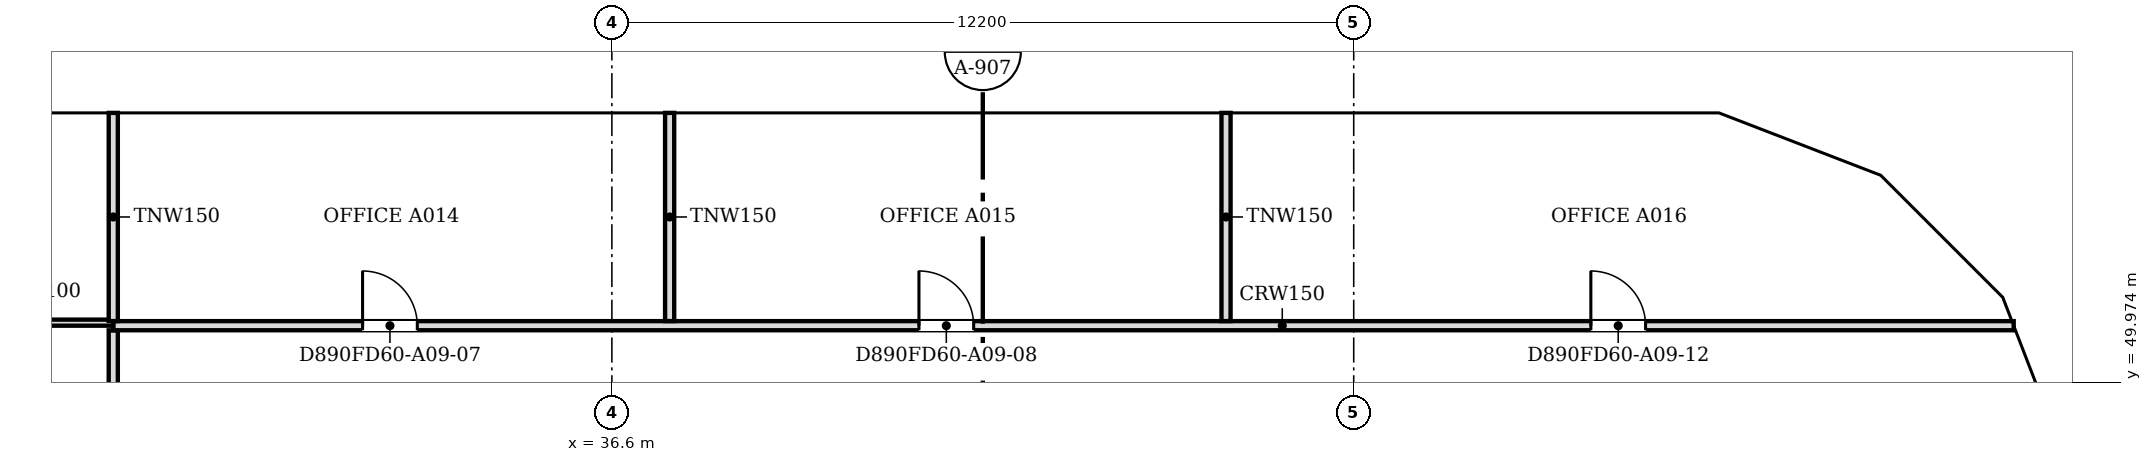
"""IFC4 building model, lengths in metres.
Left out: names, types, materials, properties, quantities, classifications, styles, units other than length and angle.
Written with IfcOpenShell. Run it as: python <this file> out.ifc"""

import sys

from ifc_helpers import new_model, si_unit, direction, frame, frame_2d, origin, place, context, subcontext, project, spatial, polyline, rectangle, outline, extrude, faceted_brep, source, transform, mapped, element, fill, save


model = new_model("IFC4")
c1 = context("Model", 3, precision=1e-05, world=origin(), true_north=direction((0.0, 1.0)))
c2 = subcontext(c1, "Body", "Model", "MODEL_VIEW")
j1 = project(units=[si_unit("LENGTHUNIT", "METRE"), si_unit("PLANEANGLEUNIT", "RADIAN")], contexts=[c1])
p1 = place(None, origin())
s1 = spatial("IfcSite", under=j1, at=p1, CompositionType="ELEMENT")
p2 = place(p1, origin())
s2 = spatial("IfcBuilding", under=s1, at=p2, CompositionType="ELEMENT")
p3 = place(p2, frame((0.0, 0.0, 102.8)))
s3 = spatial("IfcBuildingStorey", under=s2, at=p3, CompositionType="ELEMENT", Elevation=102.8)
m1 = source(origin(), c2, "Body", "Brep", [
    faceted_brep([(0.047, -0.25, 0.0), (2.997, -0.25, 3.8), (0.047, -0.25, 7.6), (0.0, -0.25, 7.541), (0.0, -0.25, 0.059), (0.093, 0.25, 7.54), (2.944, 0.25, 3.868), (2.944, 0.25, 3.732), (0.093, 0.25, 0.06), (2.997, 0.0, 3.8), (0.047, 0.0, 0.0), (0.047, 0.0, 7.6)], [[[0, 1, 2, 3, 4]], [[5, 6, 7, 8]], [[8, 7, 9, 1, 0, 10]], [[6, 5, 11, 2, 1, 9]], [[3, 2, 11]], [[10, 0, 4]], [[8, 10, 4, 3, 11, 5]], [[9, 7, 6]]]),
])
p4 = place(p3, frame((60.767, 48.71, -3.8), z_axis=(0.0, 0.0, 1.0), x_axis=(-0.359901446078, 0.932990326376, 0.0)))
e1 = element("IfcWall", 1, at=p4, inside=s3, PredefinedType="SOLIDWALL", context=c2, shape_type="MappedRepresentation", body=[
    mapped(m1, transform((0.0, 0.0, 0.0), scale=1.0)),
])
m2 = source(origin(), c2, "Body", "SweptSolid", [
    extrude(outline(polyline([(0.247, 0.665), (2.681, 3.8), (0.247, 6.935), (0.247, 0.665)])), frame((0.0, 0.26, 0.0), z_axis=(0.0, -1.0, 0.0), x_axis=(1.0, 0.0, 0.0)), (0.0, 0.0, 1.0), 0.52),
])
p5 = place(p4, origin())
e2 = element("IfcOpeningElement", 2, at=p5, cuts=e1, PredefinedType="OPENING", context=c2, shape_type="MappedRepresentation", body=[
    mapped(m2, transform((0.0, 0.0, 0.0), scale=1.0)),
])
m3 = source(origin(), c2, "Body", "Brep", [
    faceted_brep([(2.944, -0.25, 0.0), (2.997, -0.25, 0.068), (2.997, -0.25, 7.532), (2.944, -0.25, 7.6), (0.0, -0.25, 3.8), (0.053, 0.25, 3.868), (2.891, 0.25, 7.532), (2.891, 0.25, 0.068), (0.053, 0.25, 3.732), (2.944, 0.0, 0.0), (2.944, 0.0, 7.6), (0.0, 0.0, 3.8)], [[[0, 1, 2, 3, 4]], [[5, 6, 7, 8]], [[1, 0, 9]], [[10, 3, 2]], [[6, 5, 11, 4, 3, 10]], [[8, 7, 9, 0, 4, 11]], [[8, 11, 5]], [[1, 9, 7, 6, 10, 2]]]),
])
p6 = place(p3, frame((59.688, 51.506, -3.8), z_axis=(0.0, 0.0, 1.0), x_axis=(-0.707106781187, 0.707106781187, 0.0)))
e3 = element("IfcWall", 3, at=p6, inside=s3, PredefinedType="SOLIDWALL", context=c2, shape_type="MappedRepresentation", body=[
    mapped(m3, transform((0.0, 0.0, 0.0), scale=1.0)),
])
m4 = source(origin(), c2, "Body", "SweptSolid", [
    extrude(outline(polyline([(2.744, 6.934), (0.316, 3.8), (2.744, 0.666), (2.744, 6.934)])), frame((0.0, 0.26, 0.0), z_axis=(0.0, -1.0, 0.0), x_axis=(1.0, 0.0, 0.0)), (0.0, 0.0, 1.0), 0.52),
])
p7 = place(p6, origin())
e4 = element("IfcOpeningElement", 4, at=p7, cuts=e3, PredefinedType="OPENING", context=c2, shape_type="MappedRepresentation", body=[
    mapped(m4, transform((0.0, 0.0, 0.0), scale=1.0)),
])
m5 = source(origin(), c2, "Body", "Brep", [
    faceted_brep([(0.053, -0.25, 0.0), (3.003, -0.25, 3.8), (0.053, -0.25, 7.6), (0.0, -0.25, 7.532), (0.0, -0.25, 0.068), (0.106, 0.25, 7.532), (2.957, 0.25, 3.86), (2.957, 0.25, 3.74), (0.106, 0.25, 0.068), (3.003, 0.0, 3.8), (0.053, 0.0, 0.0), (0.053, 0.0, 7.6)], [[[0, 1, 2, 3, 4]], [[5, 6, 7, 8]], [[8, 7, 9, 1, 0, 10]], [[6, 5, 11, 2, 1, 9]], [[3, 2, 11]], [[10, 0, 4]], [[8, 10, 4, 3, 11, 5]], [[9, 7, 6]]]),
])
p8 = place(p3, frame((57.656, 53.569, -3.8), z_axis=(0.0, 0.0, 1.0), x_axis=(-0.933007896601, 0.359855894603, 0.0)))
e5 = element("IfcWall", 5, at=p8, inside=s3, PredefinedType="SOLIDWALL", context=c2, shape_type="MappedRepresentation", body=[
    mapped(m5, transform((0.0, 0.0, 0.0), scale=1.0)),
])
m6 = source(origin(), c2, "Body", "SweptSolid", [
    extrude(outline(polyline([(0.253, 0.665), (2.687, 3.8), (0.253, 6.935), (0.253, 0.665)])), frame((0.0, 0.26, 0.0), z_axis=(0.0, -1.0, 0.0), x_axis=(1.0, 0.0, 0.0)), (0.0, 0.0, 1.0), 0.52),
])
p9 = place(p8, origin())
e6 = element("IfcOpeningElement", 6, at=p9, cuts=e5, PredefinedType="OPENING", context=c2, shape_type="MappedRepresentation", body=[
    mapped(m6, transform((0.0, 0.0, 0.0), scale=1.0)),
])
m7 = source(origin(), c2, "Body", "Brep", [
    faceted_brep([(3.003, -0.25, 0.0), (6.053, -0.25, 3.8), (3.003, -0.25, 7.6), (0.0, -0.25, 3.8), (0.047, 0.25, 3.859), (3.003, 0.25, 7.6), (6.053, 0.25, 3.8), (3.003, 0.25, 0.0), (0.047, 0.25, 3.741), (0.0, 0.0, 3.8)], [[[0, 1, 2, 3]], [[4, 5, 6, 7, 8]], [[7, 6, 1, 0]], [[6, 5, 2, 1]], [[5, 4, 9, 3, 2]], [[8, 7, 0, 3, 9]], [[8, 9, 4]]]),
])
p10 = place(p3, frame((54.854, 54.65, -3.8), z_axis=(0.0, 0.0, 1.0), x_axis=(-1.0, 0.0, 0.0)))
e7 = element("IfcWall", 7, at=p10, inside=s3, PredefinedType="SOLIDWALL", context=c2, shape_type="MappedRepresentation", body=[
    mapped(m7, transform((0.0, 0.0, 0.0), scale=1.0)),
])
m8 = source(origin(), c2, "Body", "SweptSolid", [
    extrude(outline(polyline([(3.005, 0.401), (5.733, 3.8), (3.005, 7.199), (0.319, 3.8), (3.005, 0.401)])), frame((0.0, 0.26, 0.0), z_axis=(0.0, -1.0, 0.0), x_axis=(1.0, 0.0, 0.0)), (0.0, 0.0, 1.0), 0.52),
])
p11 = place(p10, origin())
e8 = element("IfcOpeningElement", 8, at=p11, cuts=e7, PredefinedType="OPENING", context=c2, shape_type="MappedRepresentation", body=[
    mapped(m8, transform((0.0, 0.0, 0.0), scale=1.0)),
])
m9 = source(origin(), c2, "Body", "SweptSolid", [
    extrude(outline(polyline([(3.05, 0.0), (6.1, 3.8), (3.05, 7.6), (0.0, 3.8), (3.05, 0.0)])), frame((0.0, 0.25, 0.0), z_axis=(0.0, -1.0, 0.0), x_axis=(1.0, 0.0, 0.0)), (0.0, 0.0, 1.0), 0.5),
])
p12 = place(p3, frame((48.8, 54.65, -3.8), z_axis=(0.0, 0.0, 1.0), x_axis=(-1.0, 0.0, 0.0)))
e9 = element("IfcWall", 9, at=p12, inside=s3, PredefinedType="SOLIDWALL", context=c2, shape_type="MappedRepresentation", body=[
    mapped(m9, transform((0.0, 0.0, 0.0), scale=1.0)),
])
m10 = source(origin(), c2, "Body", "SweptSolid", [
    extrude(outline(polyline([(3.05, 0.399), (5.78, 3.8), (3.05, 7.201), (0.321, 3.8), (3.05, 0.399)])), frame((0.0, 0.26, 0.0), z_axis=(0.0, -1.0, 0.0), x_axis=(1.0, 0.0, 0.0)), (0.0, 0.0, 1.0), 0.52),
])
p13 = place(p12, origin())
e10 = element("IfcOpeningElement", 10, at=p13, cuts=e9, PredefinedType="OPENING", context=c2, shape_type="MappedRepresentation", body=[
    mapped(m10, transform((0.0, 0.0, 0.0), scale=1.0)),
])
m11 = source(origin(), c2, "Body", "Brep", [
    faceted_brep([(3.05, -0.25, 0.0), (6.1, -0.25, 3.8), (6.1, -0.25, 3.8), (3.05, -0.25, 7.6), (0.0, -0.25, 3.8), (0.0, 0.25, 3.8), (3.05, 0.25, 7.6), (6.1, 0.25, 3.8), (6.1, 0.25, 3.8), (3.05, 0.25, 0.0)], [[[0, 1, 2, 3, 4]], [[5, 6, 7, 8, 9]], [[9, 8, 1, 0]], [[7, 6, 3, 2]], [[6, 5, 4, 3]], [[5, 9, 0, 4]], [[1, 8, 7, 2]]]),
])
p14 = place(p3, frame((42.7, 54.65, -3.8), z_axis=(0.0, 0.0, 1.0), x_axis=(-1.0, 0.0, 0.0)))
e11 = element("IfcWall", 11, at=p14, inside=s3, PredefinedType="SOLIDWALL", context=c2, shape_type="MappedRepresentation", body=[
    mapped(m11, transform((0.0, 0.0, 0.0), scale=1.0)),
])
p15 = place(p14, origin())
e12 = element("IfcOpeningElement", 12, at=p15, cuts=e11, PredefinedType="OPENING", context=c2, shape_type="MappedRepresentation", body=[
    mapped(m10, transform((0.0, 0.0, 0.0), scale=1.0)),
])
p16 = place(p3, frame((36.6, 54.65, -3.8), z_axis=(0.0, 0.0, 1.0), x_axis=(-1.0, 0.0, 0.0)))
e13 = element("IfcWall", 13, at=p16, inside=s3, PredefinedType="SOLIDWALL", context=c2, shape_type="MappedRepresentation", body=[
    mapped(m9, transform((0.0, 0.0, 0.0), scale=1.0)),
])
p17 = place(p16, origin())
e14 = element("IfcOpeningElement", 14, at=p17, cuts=e13, PredefinedType="OPENING", context=c2, shape_type="MappedRepresentation", body=[
    mapped(m10, transform((0.0, 0.0, 0.0), scale=1.0)),
])
p18 = place(p3, frame((30.5, 54.65, -3.8), z_axis=(0.0, 0.0, 1.0), x_axis=(-1.0, 0.0, 0.0)))
e15 = element("IfcWall", 15, at=p18, inside=s3, PredefinedType="SOLIDWALL", context=c2, shape_type="MappedRepresentation", body=[
    mapped(m9, transform((0.0, 0.0, 0.0), scale=1.0)),
])
p19 = place(p18, origin())
e16 = element("IfcOpeningElement", 16, at=p19, cuts=e15, PredefinedType="OPENING", context=c2, shape_type="MappedRepresentation", body=[
    mapped(m10, transform((0.0, 0.0, 0.0), scale=1.0)),
])
m12 = source(origin(), c2, "Body", "Brep", [
    faceted_brep([(2.95, -0.25, 0.0), (3.003, -0.25, 0.068), (3.003, -0.25, 3.8), (0.0, -0.25, 3.8), (0.047, 0.25, 3.8), (2.898, 0.25, 3.8), (2.898, 0.25, 0.068), (0.047, 0.25, 3.74), (2.95, 0.0, 0.0), (0.0, 0.0, 3.8)], [[[0, 1, 2, 3]], [[4, 5, 6, 7]], [[1, 0, 8]], [[5, 4, 9, 3, 2]], [[7, 6, 8, 0, 3, 9]], [[7, 9, 4]], [[1, 8, 6, 5, 2]]]),
])
p20 = place(p3, frame((60.75, 48.753, 0.0), z_axis=(0.0, 0.0, 1.0), x_axis=(-0.35992665181, 0.932980602862, 0.0)))
e17 = element("IfcWall", 17, at=p20, inside=s3, PredefinedType="SOLIDWALL", context=c2, shape_type="MappedRepresentation", body=[
    mapped(m12, transform((0.0, 0.0, 0.0), scale=1.0)),
])
m13 = source(origin(), c2, "Body", "SweptSolid", [
    extrude(outline(polyline([(2.75, 3.55), (0.511, 3.55), (2.75, 0.665), (2.75, 3.55)])), frame((0.0, 0.26, 0.0), z_axis=(0.0, -1.0, 0.0), x_axis=(1.0, 0.0, 0.0)), (0.0, 0.0, 1.0), 0.52),
])
p21 = place(p20, origin())
e18 = element("IfcOpeningElement", 18, at=p21, cuts=e17, PredefinedType="OPENING", context=c2, shape_type="MappedRepresentation", body=[
    mapped(m13, transform((0.0, 0.0, 0.0), scale=1.0)),
])
m14 = source(origin(), c2, "Body", "Brep", [
    faceted_brep([(0.053, -0.25, 0.0), (2.997, -0.25, 3.8), (0.0, -0.25, 3.8), (0.0, -0.25, 0.068), (0.106, 0.25, 3.8), (2.944, 0.25, 3.8), (2.944, 0.25, 3.732), (0.106, 0.25, 0.068), (2.997, 0.0, 3.8), (0.053, 0.0, 0.0)], [[[0, 1, 2, 3]], [[4, 5, 6, 7]], [[7, 6, 8, 1, 0, 9]], [[5, 4, 2, 1, 8]], [[9, 0, 3]], [[7, 9, 3, 2, 4]], [[6, 5, 8]]]),
])
p22 = place(p3, frame((59.726, 51.469, 0.0), z_axis=(0.0, 0.0, 1.0), x_axis=(-0.707106781187, 0.707106781187, 0.0)))
e19 = element("IfcWall", 19, at=p22, inside=s3, PredefinedType="SOLIDWALL", context=c2, shape_type="MappedRepresentation", body=[
    mapped(m14, transform((0.0, 0.0, 0.0), scale=1.0)),
])
m15 = source(origin(), c2, "Body", "SweptSolid", [
    extrude(outline(polyline([(0.253, 0.666), (2.487, 3.55), (0.253, 3.55), (0.253, 0.666)])), frame((0.0, 0.26, 0.0), z_axis=(0.0, -1.0, 0.0), x_axis=(1.0, 0.0, 0.0)), (0.0, 0.0, 1.0), 0.52),
])
p23 = place(p22, origin())
e20 = element("IfcOpeningElement", 20, at=p23, cuts=e19, PredefinedType="OPENING", context=c2, shape_type="MappedRepresentation", body=[
    mapped(m15, transform((0.0, 0.0, 0.0), scale=1.0)),
])
m16 = source(origin(), c2, "Body", "Brep", [
    faceted_brep([(2.95, -0.25, 0.0), (2.997, -0.25, 0.059), (2.997, -0.25, 3.8), (0.0, -0.25, 3.8), (0.053, 0.25, 3.8), (2.904, 0.25, 3.8), (2.904, 0.25, 0.06), (0.053, 0.25, 3.732), (2.95, 0.0, 0.0), (0.0, 0.0, 3.8)], [[[0, 1, 2, 3]], [[4, 5, 6, 7]], [[1, 0, 8]], [[5, 4, 9, 3, 2]], [[7, 6, 8, 0, 3, 9]], [[7, 9, 4]], [[1, 8, 6, 5, 2]]]),
])
p24 = place(p3, frame((57.606, 53.588, 0.0), z_axis=(0.0, 0.0, 1.0), x_axis=(-0.932990326376, 0.359901446078, 0.0)))
e21 = element("IfcWall", 21, at=p24, inside=s3, PredefinedType="SOLIDWALL", context=c2, shape_type="MappedRepresentation", body=[
    mapped(m16, transform((0.0, 0.0, 0.0), scale=1.0)),
])
p25 = place(p24, origin())
e22 = element("IfcOpeningElement", 22, at=p25, cuts=e21, PredefinedType="OPENING", context=c2, shape_type="MappedRepresentation", body=[
    mapped(m13, transform((0.0, 0.0, 0.0), scale=1.0)),
])
m17 = source(origin(), c2, "Body", "Brep", [
    faceted_brep([(0.047, -0.25, 0.0), (3.05, -0.25, 3.8), (0.0, -0.25, 3.8), (0.0, -0.25, 0.06), (0.093, 0.25, 3.8), (3.05, 0.25, 3.8), (0.093, 0.25, 0.059), (0.047, 0.0, 0.0)], [[[0, 1, 2, 3]], [[4, 5, 6]], [[6, 5, 1, 0, 7]], [[5, 4, 2, 1]], [[7, 0, 3]], [[6, 7, 3, 2, 4]]]),
])
p26 = place(p3, frame((54.9, 54.65, 0.0), z_axis=(0.0, 0.0, 1.0), x_axis=(-1.0, 0.0, 0.0)))
e23 = element("IfcWall", 23, at=p26, inside=s3, PredefinedType="SOLIDWALL", context=c2, shape_type="MappedRepresentation", body=[
    mapped(m17, transform((0.0, 0.0, 0.0), scale=1.0)),
])
m18 = source(origin(), c2, "Body", "SweptSolid", [
    extrude(outline(polyline([(0.247, 0.656), (2.534, 3.55), (0.247, 3.55), (0.247, 0.656)])), frame((0.0, 0.26, 0.0), z_axis=(0.0, -1.0, 0.0), x_axis=(1.0, 0.0, 0.0)), (0.0, 0.0, 1.0), 0.52),
])
p27 = place(p26, origin())
e24 = element("IfcOpeningElement", 24, at=p27, cuts=e23, PredefinedType="OPENING", context=c2, shape_type="MappedRepresentation", body=[
    mapped(m18, transform((0.0, 0.0, 0.0), scale=1.0)),
])
m19 = source(origin(), c2, "Body", "SweptSolid", [
    extrude(outline(polyline([(3.05, 0.0), (6.1, 3.8), (0.0, 3.8), (3.05, 0.0)])), frame((0.0, 0.25, 0.0), z_axis=(0.0, -1.0, 0.0), x_axis=(1.0, 0.0, 0.0)), (0.0, 0.0, 1.0), 0.5),
])
p28 = place(p3, frame((51.85, 54.65, 0.0), z_axis=(0.0, 0.0, 1.0), x_axis=(-1.0, 0.0, 0.0)))
e25 = element("IfcWall", 25, at=p28, inside=s3, PredefinedType="SOLIDWALL", context=c2, shape_type="MappedRepresentation", body=[
    mapped(m19, transform((0.0, 0.0, 0.0), scale=1.0)),
])
m20 = source(origin(), c2, "Body", "SweptSolid", [
    extrude(outline(polyline([(3.05, 0.399), (5.579, 3.55), (0.521, 3.55), (3.05, 0.399)])), frame((0.0, 0.26, 0.0), z_axis=(0.0, -1.0, 0.0), x_axis=(1.0, 0.0, 0.0)), (0.0, 0.0, 1.0), 0.52),
])
p29 = place(p28, origin())
e26 = element("IfcOpeningElement", 26, at=p29, cuts=e25, PredefinedType="OPENING", context=c2, shape_type="MappedRepresentation", body=[
    mapped(m20, transform((0.0, 0.0, 0.0), scale=1.0)),
])
p30 = place(p3, frame((45.75, 54.65, 0.0), z_axis=(0.0, 0.0, 1.0), x_axis=(-1.0, 0.0, 0.0)))
e27 = element("IfcWall", 27, at=p30, inside=s3, PredefinedType="SOLIDWALL", context=c2, shape_type="MappedRepresentation", body=[
    mapped(m19, transform((0.0, 0.0, 0.0), scale=1.0)),
])
p31 = place(p30, origin())
e28 = element("IfcOpeningElement", 28, at=p31, cuts=e27, PredefinedType="OPENING", context=c2, shape_type="MappedRepresentation", body=[
    mapped(m20, transform((0.0, 0.0, 0.0), scale=1.0)),
])
m21 = source(origin(), c2, "Body", "Brep", [
    faceted_brep([(3.05, -0.25, 0.0), (6.1, -0.25, 3.8), (6.1, -0.25, 3.8), (0.0, -0.25, 3.8), (0.0, 0.25, 3.8), (6.1, 0.25, 3.8), (6.1, 0.25, 3.8), (3.05, 0.25, 0.0)], [[[0, 1, 2, 3]], [[4, 5, 6, 7]], [[7, 6, 1, 0]], [[5, 4, 3, 2]], [[4, 7, 0, 3]], [[1, 6, 5, 2]]]),
])
p32 = place(p3, frame((39.65, 54.65, 0.0), z_axis=(0.0, 0.0, 1.0), x_axis=(-1.0, 0.0, 0.0)))
e29 = element("IfcWall", 29, at=p32, inside=s3, PredefinedType="SOLIDWALL", context=c2, shape_type="MappedRepresentation", body=[
    mapped(m21, transform((0.0, 0.0, 0.0), scale=1.0)),
])
p33 = place(p32, origin())
e30 = element("IfcOpeningElement", 30, at=p33, cuts=e29, PredefinedType="OPENING", context=c2, shape_type="MappedRepresentation", body=[
    mapped(m20, transform((0.0, 0.0, 0.0), scale=1.0)),
])
p34 = place(p3, frame((33.55, 54.65, 0.0), z_axis=(0.0, 0.0, 1.0), x_axis=(-1.0, 0.0, 0.0)))
e31 = element("IfcWall", 31, at=p34, inside=s3, PredefinedType="SOLIDWALL", context=c2, shape_type="MappedRepresentation", body=[
    mapped(m19, transform((0.0, 0.0, 0.0), scale=1.0)),
])
p35 = place(p34, origin())
e32 = element("IfcOpeningElement", 32, at=p35, cuts=e31, PredefinedType="OPENING", context=c2, shape_type="MappedRepresentation", body=[
    mapped(m20, transform((0.0, 0.0, 0.0), scale=1.0)),
])
p36 = place(p3, frame((27.45, 54.65, 0.0), z_axis=(0.0, 0.0, 1.0), x_axis=(-1.0, 0.0, 0.0)))
e33 = element("IfcWall", 33, at=p36, inside=s3, PredefinedType="SOLIDWALL", context=c2, shape_type="MappedRepresentation", body=[
    mapped(m21, transform((0.0, 0.0, 0.0), scale=1.0)),
])
p37 = place(p36, origin())
e34 = element("IfcOpeningElement", 34, at=p37, cuts=e33, PredefinedType="OPENING", context=c2, shape_type="MappedRepresentation", body=[
    mapped(m20, transform((0.0, 0.0, 0.0), scale=1.0)),
])
p38 = place(p3, frame((28.4, 48.176, 0.0), z_axis=(0.0, 0.0, 1.0), x_axis=(0.0, 1.0, 0.0)))
e35 = element("IfcWall", 35, at=p38, inside=s3, PredefinedType="PARTITIONING", context=c2, shape_type="SweptSolid", body=[
    extrude(rectangle(XDim=2.648, YDim=0.15, at=frame_2d((1.324, 0.0))), origin(), (0.0, 0.0, 1.0), 2.715),
])
p39 = place(p3, frame((28.4, 50.9, 0.0), z_axis=(0.0, 0.0, 1.0), x_axis=(1.0, 0.0, 0.0)))
e36 = element("IfcWall", 36, at=p39, inside=s3, PredefinedType="PARTITIONING", context=c2, shape_type="SweptSolid", body=[
    extrude(rectangle(XDim=31.254, YDim=0.15, at=frame_2d((15.627, 0.0))), origin(), (0.0, 0.0, 1.0), 2.715),
])
m22 = source(origin(), c2, "Body", "SweptSolid", [
    extrude(rectangle(XDim=0.9, YDim=2.1, at=frame_2d((0.45, 1.05))), frame((0.0, 0.085, 0.0), z_axis=(0.0, -1.0, 0.0), x_axis=(1.0, 0.0, 0.0)), (0.0, 0.0, 1.0), 0.17),
])
p40 = place(p39, frame((4.1, 0.0, 0.0)))
e37 = element("IfcOpeningElement", 37, at=p40, cuts=e36, PredefinedType="OPENING", context=c2, shape_type="MappedRepresentation", body=[
    mapped(m22, transform((0.0, 0.0, 0.0), scale=1.0)),
])
p41 = place(p39, frame((13.25, 0.0, 0.0)))
e38 = element("IfcOpeningElement", 38, at=p41, cuts=e36, PredefinedType="OPENING", context=c2, shape_type="MappedRepresentation", body=[
    mapped(m22, transform((0.0, 0.0, 0.0), scale=1.0)),
])
p42 = place(p39, frame((24.3, 0.0, 0.0)))
e39 = element("IfcOpeningElement", 39, at=p42, cuts=e36, PredefinedType="OPENING", context=c2, shape_type="MappedRepresentation", body=[
    mapped(m22, transform((0.0, 0.0, 0.0), scale=1.0)),
])
p43 = place(p3, frame((22.826, 50.95, 0.0), z_axis=(0.0, 0.0, 1.0), x_axis=(1.0, 0.0, 0.0)))
e40 = element("IfcWall", 40, at=p43, inside=s3, PredefinedType="PARTITIONING", context=c2, shape_type="SweptSolid", body=[
    extrude(rectangle(XDim=5.573, YDim=0.1, at=frame_2d((2.787, 0.0))), origin(), (0.0, 0.0, 1.0), 2.715),
])
m23 = source(origin(), c2, "Body", "SweptSolid", [
    extrude(rectangle(XDim=0.9, YDim=2.1, at=frame_2d((0.45, 1.05))), frame((0.0, 0.06, 0.0), z_axis=(0.0, -1.0, 0.0), x_axis=(1.0, 0.0, 0.0)), (0.0, 0.0, 1.0), 0.12),
])
p44 = place(p43, frame((2.3, 0.0, 0.0)))
e41 = element("IfcOpeningElement", 41, at=p44, cuts=e40, PredefinedType="OPENING", context=c2, shape_type="MappedRepresentation", body=[
    mapped(m23, transform((0.0, 0.0, 0.0), scale=1.0)),
])
for number, where, z_axis, x_axis in (
    (42, (28.4, 50.976, 0.0), (0.0, 0.0, 1.0), (0.0, 1.0, 0.0)),
    (43, (37.55, 50.976, 0.0), (0.0, 0.0, 1.0), (0.0, 1.0, 0.0)),
    (44, (46.7, 50.976, 0.0), (0.0, 0.0, 1.0), (0.0, 1.0, 0.0)),
):
    element("IfcWall", number, at=place(p3, frame(where, z_axis=z_axis, x_axis=x_axis)), inside=s3, PredefinedType="PARTITIONING", context=c2, shape_type="SweptSolid", body=[
        extrude(rectangle(XDim=3.424, YDim=0.15, at=frame_2d((1.712, 0.0))), origin(), (0.0, 0.0, 1.0), 2.715),
    ])
m24 = source(origin(), c2, "Body", "SweptSolid", [
    extrude(rectangle(XDim=0.9, YDim=2.1, at=frame_2d((0.45, 1.05))), frame((0.0, 0.025, 0.0), z_axis=(0.0, -1.0, 0.0), x_axis=(1.0, 0.0, 0.0)), (0.0, 0.0, 1.0), 0.05),
])
p45 = place(p40, origin())
e45 = element("IfcDoor", 45, at=p45, inside=s3, OperationType="SINGLE_SWING_LEFT", PredefinedType="DOOR", context=c2, shape_type="MappedRepresentation", body=[
    mapped(m24, transform((0.0, 0.0, 0.0), scale=1.0)),
])
fill(e37, e45)
p46 = place(p41, origin())
e46 = element("IfcDoor", 46, at=p46, inside=s3, OperationType="SINGLE_SWING_LEFT", PredefinedType="DOOR", context=c2, shape_type="MappedRepresentation", body=[
    mapped(m24, transform((0.0, 0.0, 0.0), scale=1.0)),
])
fill(e38, e46)
p47 = place(p42, origin())
e47 = element("IfcDoor", 47, at=p47, inside=s3, OperationType="SINGLE_SWING_LEFT", PredefinedType="DOOR", context=c2, shape_type="MappedRepresentation", body=[
    mapped(m24, transform((0.0, 0.0, 0.0), scale=1.0)),
])
fill(e39, e47)
save(model, sys.argv[1])
